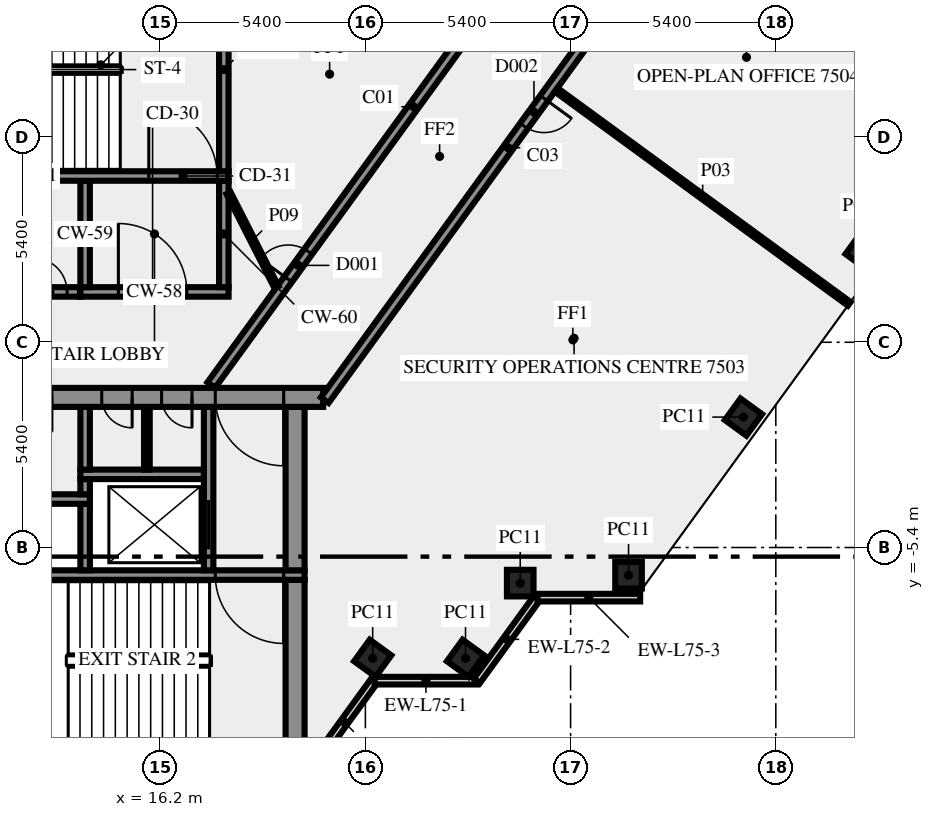
"""IFC4 building model, lengths in metres.
Left out: names, types, materials, properties, quantities, classifications, styles, units other than length and angle.
Written with IfcOpenShell. Run it as: python <this file> out.ifc"""

import sys

from ifc_helpers import new_model, si_unit, direction, frame, frame_2d, origin, origin_2d, place, context, subcontext, project, spatial, rectangle, extrude, element, fill, save


model = new_model("IFC4")
c1 = context("Model", 3, precision=1e-05, world=origin(), true_north=direction((0.0, 1.0)))
c2 = subcontext(c1, "Body", "Model", "MODEL_VIEW")
j1 = project(units=[si_unit("LENGTHUNIT", "METRE"), si_unit("PLANEANGLEUNIT", "RADIAN")], contexts=[c1])
p1 = place(None, origin())
s1 = spatial("IfcSite", under=j1, at=p1, CompositionType="ELEMENT")
p2 = place(p1, origin())
s2 = spatial("IfcBuilding", under=s1, at=p2, CompositionType="ELEMENT")
p3 = place(p2, frame((0.0, 0.0, 323.0)))
s3 = spatial("IfcBuildingStorey", under=s2, at=p3, CompositionType="ELEMENT", Elevation=323.0)
for number, where, z_axis, x_axis in (
    (1, (21.792, -8.315, 0.0), (0.0, 0.0, 1.0), (0.588, 0.809, 0.0)),
    (2, (24.235, -8.315, 0.0), (0.0, 0.0, 1.0), (0.588, 0.809, 0.0)),
    (3, (25.674, -6.337, 0.0), (0.0, 0.0, 1.0), (1.0, 0.0, 0.0)),
    (4, (28.525, -6.13, 0.0), (0.0, 0.0, 1.0), (1.0, 0.0, 0.0)),
    (5, (31.548, -1.969, 0.0), (0.0, 0.0, 1.0), (0.588, 0.809, 0.0)),
    (6, (34.722, 2.4, 0.0), (0.0, 0.0, 1.0), (0.588, 0.809, 0.0)),
):
    element("IfcColumn", number, at=place(p3, frame(where, z_axis=z_axis, x_axis=x_axis)), inside=s3, PredefinedType="COLUMN", context=c2, shape_type="SweptSolid", body=[
        extrude(rectangle(XDim=0.7, YDim=0.7, at=origin_2d()), origin(), (0.0, 0.0, 1.0), 3.65),
    ])
p4 = place(p3, frame((20.253, -11.083, 0.0), z_axis=(0.0, 0.0, 1.0), x_axis=(0.587766567315, 0.809030569476, 0.0)))
e7 = element("IfcWall", 7, at=p4, inside=s3, PredefinedType="SOLIDWALL", context=c2, shape_type="SweptSolid", body=[
    extrude(rectangle(XDim=2.688, YDim=0.2, at=frame_2d((1.344, 0.0))), origin(), (0.0, 0.0, 1.0), 3.65),
])
p5 = place(p3, frame((21.843, -8.904, 0.0), z_axis=(0.0, 0.0, 1.0), x_axis=(1.0, 0.0, 0.0)))
e8 = element("IfcWall", 8, at=p5, inside=s3, PredefinedType="SOLIDWALL", context=c2, shape_type="SweptSolid", body=[
    extrude(rectangle(XDim=2.7, YDim=0.2, at=frame_2d((1.35, 0.0))), origin(), (0.0, 0.0, 1.0), 3.65),
])
p6 = place(p3, frame((24.533, -8.909, 0.0), z_axis=(0.0, 0.0, 1.0), x_axis=(0.587720002413, 0.809064397168, 0.0)))
e9 = element("IfcWall", 9, at=p6, inside=s3, PredefinedType="SOLIDWALL", context=c2, shape_type="SweptSolid", body=[
    extrude(rectangle(XDim=2.7, YDim=0.2, at=frame_2d((1.35, 0.0))), origin(), (0.0, 0.0, 1.0), 3.65),
])
p7 = place(p3, frame((26.13, -6.719, 0.0), z_axis=(0.0, 0.0, 1.0), x_axis=(1.0, 0.0, 0.0)))
e10 = element("IfcWall", 10, at=p7, inside=s3, PredefinedType="SOLIDWALL", context=c2, shape_type="SweptSolid", body=[
    extrude(rectangle(XDim=2.7, YDim=0.2, at=frame_2d((1.35, 0.0))), origin(), (0.0, 0.0, 1.0), 3.65),
])
p8 = place(p3, frame((19.75, -10.5, 0.0), z_axis=(0.0, 0.0, 1.0), x_axis=(0.0, 1.0, 0.0)))
e11 = element("IfcWall", 11, at=p8, inside=s3, PredefinedType="SHEAR", context=c2, shape_type="SweptSolid", body=[
    extrude(rectangle(XDim=4.25, YDim=0.5, at=frame_2d((2.125, 0.0))), origin(), (0.0, 0.0, 1.0), 3.65),
])
p9 = place(p3, frame((20.0, -6.125, 0.0), z_axis=(0.0, 0.0, 1.0), x_axis=(-1.0, 0.0, 0.0)))
e12 = element("IfcWall", 12, at=p9, inside=s3, PredefinedType="SHEAR", context=c2, shape_type="SweptSolid", body=[
    extrude(rectangle(XDim=10.8, YDim=0.25, at=frame_2d((5.4, 0.0))), origin(), (0.0, 0.0, 1.0), 3.65),
])
p10 = place(p9, frame((0.55, 0.0, 0.0)))
e13 = element("IfcOpeningElement", 13, at=p10, cuts=e12, PredefinedType="OPENING", context=c2, shape_type="SweptSolid", body=[
    extrude(rectangle(XDim=1.8, YDim=2.1, at=frame_2d((0.9, 1.05))), frame((0.0, 0.135, 0.0), z_axis=(0.0, -1.0, 0.0), x_axis=(1.0, 0.0, 0.0)), (0.0, 0.0, 1.0), 0.27),
])
p11 = place(p3, frame((14.225, -6.0, 0.0), z_axis=(0.0, 0.0, 1.0), x_axis=(0.0, 1.0, 0.0)))
e14 = element("IfcWall", 14, at=p11, inside=s3, PredefinedType="SHEAR", context=c2, shape_type="SweptSolid", body=[
    extrude(rectangle(XDim=1.75, YDim=0.25, at=frame_2d((0.875, 0.0))), origin(), (0.0, 0.0, 1.0), 3.65),
])
p12 = place(p3, frame((17.475, -6.0, 0.0), z_axis=(0.0, 0.0, 1.0), x_axis=(0.0, 1.0, 0.0)))
e15 = element("IfcWall", 15, at=p12, inside=s3, PredefinedType="SHEAR", context=c2, shape_type="SweptSolid", body=[
    extrude(rectangle(XDim=4.3, YDim=0.25, at=frame_2d((2.15, 0.0))), origin(), (0.0, 0.0, 1.0), 3.65),
])
p13 = place(p12, frame((0.55, 0.0, 0.0)))
e16 = element("IfcOpeningElement", 16, at=p13, cuts=e15, PredefinedType="OPENING", context=c2, shape_type="SweptSolid", body=[
    extrude(rectangle(XDim=1.3, YDim=2.1, at=frame_2d((0.65, 1.05))), frame((0.0, 0.135, 0.0), z_axis=(0.0, -1.0, 0.0), x_axis=(1.0, 0.0, 0.0)), (0.0, 0.0, 1.0), 0.27),
])
p14 = place(p3, frame((19.75, -6.0, 0.0), z_axis=(0.0, 0.0, 1.0), x_axis=(0.0, 1.0, 0.0)))
e17 = element("IfcWall", 17, at=p14, inside=s3, PredefinedType="SHEAR", context=c2, shape_type="SweptSolid", body=[
    extrude(rectangle(XDim=4.3, YDim=0.5, at=frame_2d((2.15, 0.0))), origin(), (0.0, 0.0, 1.0), 3.65),
])
p15 = place(p3, frame((-0.6, -4.125, 0.0), z_axis=(0.0, 0.0, 1.0), x_axis=(1.0, 0.0, 0.0)))
e18 = element("IfcWall", 18, at=p15, inside=s3, PredefinedType="SHEAR", context=c2, shape_type="SweptSolid", body=[
    extrude(rectangle(XDim=14.95, YDim=0.25, at=frame_2d((7.475, 0.0))), origin(), (0.0, 0.0, 1.0), 3.65),
])
p16 = place(p15, frame((2.75, 0.0, 0.0)))
e19 = element("IfcOpeningElement", 19, at=p16, cuts=e18, PredefinedType="OPENING", context=c2, shape_type="SweptSolid", body=[
    extrude(rectangle(XDim=1.3, YDim=2.1, at=frame_2d((0.65, 1.05))), frame((0.0, 0.135, 0.0), z_axis=(0.0, -1.0, 0.0), x_axis=(1.0, 0.0, 0.0)), (0.0, 0.0, 1.0), 0.27),
])
p17 = place(p3, frame((14.225, -4.0, 0.0), z_axis=(0.0, 0.0, 1.0), x_axis=(0.0, 1.0, 0.0)))
e20 = element("IfcWall", 20, at=p17, inside=s3, PredefinedType="SHEAR", context=c2, shape_type="SweptSolid", body=[
    extrude(rectangle(XDim=0.4, YDim=0.25, at=frame_2d((0.2, 0.0))), origin(), (0.0, 0.0, 1.0), 3.65),
])
p18 = place(p3, frame((14.1, -3.475, 0.0), z_axis=(0.0, 0.0, 1.0), x_axis=(1.0, 0.0, 0.0)))
e21 = element("IfcWall", 21, at=p18, inside=s3, PredefinedType="SHEAR", context=c2, shape_type="SweptSolid", body=[
    extrude(rectangle(XDim=3.25, YDim=0.25, at=frame_2d((1.625, 0.0))), origin(), (0.0, 0.0, 1.0), 3.65),
])
p19 = place(p3, frame((14.225, -3.35, 0.0), z_axis=(0.0, 0.0, 1.0), x_axis=(0.0, 1.0, 0.0)))
e22 = element("IfcWall", 22, at=p19, inside=s3, PredefinedType="SHEAR", context=c2, shape_type="SweptSolid", body=[
    extrude(rectangle(XDim=1.65, YDim=0.25, at=frame_2d((0.825, 0.0))), origin(), (0.0, 0.0, 1.0), 3.65),
])
p20 = place(p3, frame((15.85, -3.35, 0.0), z_axis=(0.0, 0.0, 1.0), x_axis=(0.0, 1.0, 0.0)))
e23 = element("IfcWall", 23, at=p20, inside=s3, PredefinedType="PARTITIONING", context=c2, shape_type="SweptSolid", body=[
    extrude(rectangle(XDim=1.65, YDim=0.15, at=frame_2d((0.825, 0.0))), origin(), (0.0, 0.0, 1.0), 3.65),
])
p21 = place(p3, frame((20.49, -1.45, 0.0), z_axis=(0.0, 0.0, 1.0), x_axis=(-1.0, 0.0, 0.0)))
e24 = element("IfcWall", 24, at=p21, inside=s3, PredefinedType="SHEAR", context=c2, shape_type="SweptSolid", body=[
    extrude(rectangle(XDim=40.98, YDim=0.5, at=frame_2d((20.49, 0.0))), origin(), (0.0, 0.0, 1.0), 3.65),
])
p22 = place(p21, frame((38.14, 0.0, 0.0)))
e25 = element("IfcOpeningElement", 25, at=p22, cuts=e24, PredefinedType="OPENING", context=c2, shape_type="SweptSolid", body=[
    extrude(rectangle(XDim=1.8, YDim=2.1, at=frame_2d((0.9, 1.05))), frame((0.0, 0.26, 0.0), z_axis=(0.0, -1.0, 0.0), x_axis=(1.0, 0.0, 0.0)), (0.0, 0.0, 1.0), 0.52),
])
p23 = place(p21, frame((35.89, 0.0, 0.0)))
e26 = element("IfcOpeningElement", 26, at=p23, cuts=e24, PredefinedType="OPENING", context=c2, shape_type="SweptSolid", body=[
    extrude(rectangle(XDim=0.9, YDim=2.1, at=frame_2d((0.45, 1.05))), frame((0.0, 0.26, 0.0), z_axis=(0.0, -1.0, 0.0), x_axis=(1.0, 0.0, 0.0)), (0.0, 0.0, 1.0), 0.52),
])
p24 = place(p21, frame((32.94, 0.0, 0.0)))
e27 = element("IfcOpeningElement", 27, at=p24, cuts=e24, PredefinedType="OPENING", context=c2, shape_type="SweptSolid", body=[
    extrude(rectangle(XDim=0.9, YDim=2.1, at=frame_2d((0.45, 1.05))), frame((0.0, 0.26, 0.0), z_axis=(0.0, -1.0, 0.0), x_axis=(1.0, 0.0, 0.0)), (0.0, 0.0, 1.0), 0.52),
])
p25 = place(p21, frame((31.015, 0.0, 0.0)))
e28 = element("IfcOpeningElement", 28, at=p25, cuts=e24, PredefinedType="OPENING", context=c2, shape_type="SweptSolid", body=[
    extrude(rectangle(XDim=0.8, YDim=2.1, at=frame_2d((0.4, 1.05))), frame((0.0, 0.26, 0.0), z_axis=(0.0, -1.0, 0.0), x_axis=(1.0, 0.0, 0.0)), (0.0, 0.0, 1.0), 0.52),
])
p26 = place(p21, frame((24.765, 0.0, 0.0)))
e29 = element("IfcOpeningElement", 29, at=p26, cuts=e24, PredefinedType="OPENING", context=c2, shape_type="SweptSolid", body=[
    extrude(rectangle(XDim=0.8, YDim=2.1, at=frame_2d((0.4, 1.05))), frame((0.0, 0.26, 0.0), z_axis=(0.0, -1.0, 0.0), x_axis=(1.0, 0.0, 0.0)), (0.0, 0.0, 1.0), 0.52),
])
p27 = place(p21, frame((21.765, 0.0, 0.0)))
e30 = element("IfcOpeningElement", 30, at=p27, cuts=e24, PredefinedType="OPENING", context=c2, shape_type="SweptSolid", body=[
    extrude(rectangle(XDim=2.0, YDim=2.1, at=frame_2d((1.0, 1.05))), frame((0.0, 0.26, 0.0), z_axis=(0.0, -1.0, 0.0), x_axis=(1.0, 0.0, 0.0)), (0.0, 0.0, 1.0), 0.52),
])
p28 = place(p21, frame((15.103, 0.0, 0.0)))
e31 = element("IfcOpeningElement", 31, at=p28, cuts=e24, PredefinedType="OPENING", context=c2, shape_type="SweptSolid", body=[
    extrude(rectangle(XDim=0.9, YDim=2.1, at=frame_2d((0.45, 1.05))), frame((0.0, 0.26, 0.0), z_axis=(0.0, -1.0, 0.0), x_axis=(1.0, 0.0, 0.0)), (0.0, 0.0, 1.0), 0.52),
])
p29 = place(p21, frame((13.04, 0.0, 0.0)))
e32 = element("IfcOpeningElement", 32, at=p29, cuts=e24, PredefinedType="OPENING", context=c2, shape_type="SweptSolid", body=[
    extrude(rectangle(XDim=0.9, YDim=2.1, at=frame_2d((0.45, 1.05))), frame((0.0, 0.26, 0.0), z_axis=(0.0, -1.0, 0.0), x_axis=(1.0, 0.0, 0.0)), (0.0, 0.0, 1.0), 0.52),
])
p30 = place(p21, frame((10.177, 0.0, 0.0)))
e33 = element("IfcOpeningElement", 33, at=p30, cuts=e24, PredefinedType="OPENING", context=c2, shape_type="SweptSolid", body=[
    extrude(rectangle(XDim=0.9, YDim=2.1, at=frame_2d((0.45, 1.05))), frame((0.0, 0.26, 0.0), z_axis=(0.0, -1.0, 0.0), x_axis=(1.0, 0.0, 0.0)), (0.0, 0.0, 1.0), 0.52),
])
p31 = place(p21, frame((7.14, 0.0, 0.0)))
e34 = element("IfcOpeningElement", 34, at=p31, cuts=e24, PredefinedType="OPENING", context=c2, shape_type="SweptSolid", body=[
    extrude(rectangle(XDim=0.9, YDim=2.1, at=frame_2d((0.45, 1.05))), frame((0.0, 0.26, 0.0), z_axis=(0.0, -1.0, 0.0), x_axis=(1.0, 0.0, 0.0)), (0.0, 0.0, 1.0), 0.52),
])
p32 = place(p21, frame((5.028, 0.0, 0.0)))
e35 = element("IfcOpeningElement", 35, at=p32, cuts=e24, PredefinedType="OPENING", context=c2, shape_type="SweptSolid", body=[
    extrude(rectangle(XDim=0.8, YDim=2.1, at=frame_2d((0.4, 1.05))), frame((0.0, 0.26, 0.0), z_axis=(0.0, -1.0, 0.0), x_axis=(1.0, 0.0, 0.0)), (0.0, 0.0, 1.0), 0.52),
])
p33 = place(p21, frame((3.452, 0.0, 0.0)))
e36 = element("IfcOpeningElement", 36, at=p33, cuts=e24, PredefinedType="OPENING", context=c2, shape_type="SweptSolid", body=[
    extrude(rectangle(XDim=0.8, YDim=2.1, at=frame_2d((0.4, 1.05))), frame((0.0, 0.26, 0.0), z_axis=(0.0, -1.0, 0.0), x_axis=(1.0, 0.0, 0.0)), (0.0, 0.0, 1.0), 0.52),
])
p34 = place(p21, frame((1.04, 0.0, 0.0)))
e37 = element("IfcOpeningElement", 37, at=p34, cuts=e24, PredefinedType="OPENING", context=c2, shape_type="SweptSolid", body=[
    extrude(rectangle(XDim=1.8, YDim=2.1, at=frame_2d((0.9, 1.05))), frame((0.0, 0.26, 0.0), z_axis=(0.0, -1.0, 0.0), x_axis=(1.0, 0.0, 0.0)), (0.0, 0.0, 1.0), 0.52),
])
p35 = place(p3, frame((14.1, 1.325, 0.0), z_axis=(0.0, 0.0, 1.0), x_axis=(1.0, 0.0, 0.0)))
e38 = element("IfcWall", 38, at=p35, inside=s3, PredefinedType="SHEAR", context=c2, shape_type="SweptSolid", body=[
    extrude(rectangle(XDim=3.9, YDim=0.25, at=frame_2d((1.95, 0.0))), origin(), (0.0, 0.0, 1.0), 3.65),
])
p36 = place(p35, frame((1.0, 0.0, 0.0)))
e39 = element("IfcOpeningElement", 39, at=p36, cuts=e38, PredefinedType="OPENING", context=c2, shape_type="SweptSolid", body=[
    extrude(rectangle(XDim=1.8, YDim=2.1, at=frame_2d((0.9, 1.05))), frame((0.0, 0.135, 0.0), z_axis=(0.0, -1.0, 0.0), x_axis=(1.0, 0.0, 0.0)), (0.0, 0.0, 1.0), 0.27),
])
for number, where, z_axis, x_axis in (
    (40, (14.225, 1.45, 0.0), (0.0, 0.0, 1.0), (0.0, 1.0, 0.0)),
    (41, (17.875, 1.45, 0.0), (0.0, 0.0, 1.0), (0.0, 1.0, 0.0)),
):
    element("IfcWall", number, at=place(p3, frame(where, z_axis=z_axis, x_axis=x_axis)), inside=s3, PredefinedType="SHEAR", context=c2, shape_type="SweptSolid", body=[
        extrude(rectangle(XDim=2.8, YDim=0.25, at=frame_2d((1.4, 0.0))), origin(), (0.0, 0.0, 1.0), 3.65),
    ])
p37 = place(p3, frame((7.5, 4.375, 0.0), z_axis=(0.0, 0.0, 1.0), x_axis=(1.0, 0.0, 0.0)))
e42 = element("IfcWall", 42, at=p37, inside=s3, PredefinedType="SHEAR", context=c2, shape_type="SweptSolid", body=[
    extrude(rectangle(XDim=10.5, YDim=0.25, at=frame_2d((5.25, 0.0))), origin(), (0.0, 0.0, 1.0), 3.65),
])
p38 = place(p37, frame((8.4, 0.0, 0.0)))
e43 = element("IfcOpeningElement", 43, at=p38, cuts=e42, PredefinedType="OPENING", context=c2, shape_type="SweptSolid", body=[
    extrude(rectangle(XDim=1.8, YDim=2.1, at=frame_2d((0.9, 1.05))), frame((0.0, 0.135, 0.0), z_axis=(0.0, -1.0, 0.0), x_axis=(1.0, 0.0, 0.0)), (0.0, 0.0, 1.0), 0.27),
])
p39 = place(p3, frame((17.875, 4.5, 0.0), z_axis=(0.0, 0.0, 1.0), x_axis=(0.0, 1.0, 0.0)))
e44 = element("IfcWall", 44, at=p39, inside=s3, PredefinedType="SHEAR", context=c2, shape_type="SweptSolid", body=[
    extrude(rectangle(XDim=5.35, YDim=0.25, at=frame_2d((2.675, 0.0))), origin(), (0.0, 0.0, 1.0), 3.65),
])
p40 = place(p3, frame((17.545, -1.125, 0.0), z_axis=(0.0, 0.0, 1.0), x_axis=(0.58779555165, 0.809009511354, 0.0)))
e45 = element("IfcWall", 45, at=p40, inside=s3, PredefinedType="SOLIDWALL", context=c2, shape_type="SweptSolid", body=[
    extrude(rectangle(XDim=18.103, YDim=0.25, at=frame_2d((9.052, 0.0))), origin(), (0.0, 0.0, 1.0), 3.65),
])
p41 = place(p40, frame((3.441, 0.0, 0.0)))
e46 = element("IfcOpeningElement", 46, at=p41, cuts=e45, PredefinedType="OPENING", context=c2, shape_type="SweptSolid", body=[
    extrude(rectangle(XDim=0.9, YDim=2.1, at=frame_2d((0.45, 1.05))), frame((0.0, 0.135, 0.0), z_axis=(0.0, -1.0, 0.0), x_axis=(1.0, 0.0, 0.0)), (0.0, 0.0, 1.0), 0.27),
])
p42 = place(p3, frame((30.183, 11.761, 0.0), z_axis=(0.0, 0.0, 1.0), x_axis=(-0.587781762867, -0.80901952958, 0.0)))
e47 = element("IfcWall", 47, at=p42, inside=s3, PredefinedType="SOLIDWALL", context=c2, shape_type="SweptSolid", body=[
    extrude(rectangle(XDim=16.42, YDim=0.25, at=frame_2d((8.21, 0.0))), origin(), (0.0, 0.0, 1.0), 3.65),
])
p43 = place(p42, frame((0.225, 0.0, 0.0)))
e48 = element("IfcOpeningElement", 48, at=p43, cuts=e47, PredefinedType="OPENING", context=c2, shape_type="SweptSolid", body=[
    extrude(rectangle(XDim=0.9, YDim=2.1, at=frame_2d((0.45, 1.05))), frame((0.0, 0.135, 0.0), z_axis=(0.0, -1.0, 0.0), x_axis=(1.0, 0.0, 0.0)), (0.0, 0.0, 1.0), 0.27),
])
p44 = place(p42, frame((6.605, 0.0, 0.0)))
e49 = element("IfcOpeningElement", 49, at=p44, cuts=e47, PredefinedType="OPENING", context=c2, shape_type="SweptSolid", body=[
    extrude(rectangle(XDim=0.9, YDim=2.1, at=frame_2d((0.45, 1.05))), frame((0.0, 0.135, 0.0), z_axis=(0.0, -1.0, 0.0), x_axis=(1.0, 0.0, 0.0)), (0.0, 0.0, 1.0), 0.27),
])
p45 = place(p3, frame((-5.246, 1.325, 0.0), z_axis=(0.0, 0.0, 1.0), x_axis=(1.0, 0.0, 0.0)))
e50 = element("IfcWall", 50, at=p45, inside=s3, PredefinedType="SOLIDWALL", context=c2, shape_type="SweptSolid", body=[
    extrude(rectangle(XDim=19.336, YDim=0.25, at=frame_2d((9.668, 0.0))), origin(), (0.0, 0.0, 1.0), 3.65),
])
p46 = place(p45, frame((10.894, 0.0, 0.0)))
e51 = element("IfcOpeningElement", 51, at=p46, cuts=e50, PredefinedType="OPENING", context=c2, shape_type="SweptSolid", body=[
    extrude(rectangle(XDim=1.2, YDim=2.1, at=frame_2d((0.6, 1.05))), frame((0.0, 0.135, 0.0), z_axis=(0.0, -1.0, 0.0), x_axis=(1.0, 0.0, 0.0)), (0.0, 0.0, 1.0), 0.27),
])
p47 = place(p45, frame((18.096, 0.0, 0.0)))
e52 = element("IfcOpeningElement", 52, at=p47, cuts=e50, PredefinedType="OPENING", context=c2, shape_type="SweptSolid", body=[
    extrude(rectangle(XDim=0.9, YDim=2.1, at=frame_2d((0.45, 1.05))), frame((0.0, 0.135, 0.0), z_axis=(0.0, -1.0, 0.0), x_axis=(1.0, 0.0, 0.0)), (0.0, 0.0, 1.0), 0.27),
])
p48 = place(p3, frame((37.458, 6.76, 0.0), z_axis=(0.0, 0.0, 1.0), x_axis=(-0.809016295501, 0.587786214209, 0.0)))
e53 = element("IfcWall", 53, at=p48, inside=s3, PredefinedType="PARTITIONING", context=c2, shape_type="SweptSolid", body=[
    extrude(rectangle(XDim=8.7, YDim=0.12, at=frame_2d((4.35, 0.0))), origin(), (0.0, 0.0, 1.0), 3.65),
])
p49 = place(p3, frame((26.619, 6.643, 0.0), z_axis=(0.0, 0.0, 1.0), x_axis=(0.807594822539, -0.589737740532, 0.0)))
e54 = element("IfcWall", 54, at=p49, inside=s3, PredefinedType="PARTITIONING", context=c2, shape_type="SweptSolid", body=[
    extrude(rectangle(XDim=9.55, YDim=0.12, at=frame_2d((4.775, 0.0))), origin(), (0.0, 0.0, 1.0), 2.95),
])
p50 = place(p3, frame((18.0, 3.925, 0.0), z_axis=(0.0, 0.0, 1.0), x_axis=(0.453950796792, -0.891026752736, 0.0)))
e55 = element("IfcWall", 55, at=p50, inside=s3, PredefinedType="PARTITIONING", context=c2, shape_type="SweptSolid", body=[
    extrude(rectangle(XDim=2.778, YDim=0.12, at=frame_2d((1.389, 0.0))), origin(), (0.0, 0.0, 1.0), 3.65),
])
p51 = place(p10, origin())
e56 = element("IfcDoor", 56, at=p51, inside=s3, OperationType="DOUBLE_DOOR_SINGLE_SWING", PredefinedType="DOOR", context=c2, shape_type="SweptSolid", body=[
    extrude(rectangle(XDim=1.8, YDim=2.1, at=frame_2d((0.9, 1.05))), frame((0.0, 0.025, 0.0), z_axis=(0.0, -1.0, 0.0), x_axis=(1.0, 0.0, 0.0)), (0.0, 0.0, 1.0), 0.05),
])
fill(e13, e56)
p52 = place(p13, origin())
e57 = element("IfcDoor", 57, at=p52, inside=s3, OperationType="DOUBLE_DOOR_SLIDING", PredefinedType="DOOR", context=c2, shape_type="SweptSolid", body=[
    extrude(rectangle(XDim=1.3, YDim=2.1, at=frame_2d((0.65, 1.05))), frame((0.0, 0.025, 0.0), z_axis=(0.0, -1.0, 0.0), x_axis=(1.0, 0.0, 0.0)), (0.0, 0.0, 1.0), 0.05),
])
fill(e16, e57)
p53 = place(p32, origin())
e58 = element("IfcDoor", 58, at=p53, inside=s3, OperationType="SINGLE_SWING_LEFT", PredefinedType="DOOR", context=c2, shape_type="SweptSolid", body=[
    extrude(rectangle(XDim=0.8, YDim=2.1, at=frame_2d((0.4, 1.05))), frame((0.0, 0.025, 0.0), z_axis=(0.0, -1.0, 0.0), x_axis=(1.0, 0.0, 0.0)), (0.0, 0.0, 1.0), 0.05),
])
fill(e35, e58)
p54 = place(p33, origin())
e59 = element("IfcDoor", 59, at=p54, inside=s3, OperationType="SINGLE_SWING_LEFT", PredefinedType="DOOR", context=c2, shape_type="SweptSolid", body=[
    extrude(rectangle(XDim=0.8, YDim=2.1, at=frame_2d((0.4, 1.05))), frame((0.0, 0.025, 0.0), z_axis=(0.0, -1.0, 0.0), x_axis=(1.0, 0.0, 0.0)), (0.0, 0.0, 1.0), 0.05),
])
fill(e36, e59)
p55 = place(p34, origin())
e60 = element("IfcDoor", 60, at=p55, inside=s3, OperationType="DOUBLE_DOOR_SINGLE_SWING", PredefinedType="DOOR", context=c2, shape_type="SweptSolid", body=[
    extrude(rectangle(XDim=1.8, YDim=2.1, at=frame_2d((0.9, 1.05))), frame((0.0, 0.025, 0.0), z_axis=(0.0, -1.0, 0.0), x_axis=(1.0, 0.0, 0.0)), (0.0, 0.0, 1.0), 0.05),
])
fill(e37, e60)
p56 = place(p36, origin())
e61 = element("IfcDoor", 61, at=p56, inside=s3, OperationType="DOUBLE_DOOR_SINGLE_SWING", PredefinedType="DOOR", context=c2, shape_type="SweptSolid", body=[
    extrude(rectangle(XDim=1.8, YDim=2.1, at=frame_2d((0.9, 1.05))), frame((0.0, 0.025, 0.0), z_axis=(0.0, -1.0, 0.0), x_axis=(1.0, 0.0, 0.0)), (0.0, 0.0, 1.0), 0.05),
])
fill(e39, e61)
p57 = place(p38, origin())
e62 = element("IfcDoor", 62, at=p57, inside=s3, OperationType="DOUBLE_DOOR_SINGLE_SWING", PredefinedType="DOOR", context=c2, shape_type="SweptSolid", body=[
    extrude(rectangle(XDim=1.8, YDim=2.1, at=frame_2d((0.9, 1.05))), frame((0.0, 0.025, 0.0), z_axis=(0.0, -1.0, 0.0), x_axis=(1.0, 0.0, 0.0)), (0.0, 0.0, 1.0), 0.05),
])
fill(e43, e62)
p58 = place(p41, origin())
e63 = element("IfcDoor", 63, at=p58, inside=s3, OperationType="SINGLE_SWING_LEFT", PredefinedType="DOOR", context=c2, shape_type="SweptSolid", body=[
    extrude(rectangle(XDim=0.9, YDim=2.1, at=frame_2d((0.45, 1.05))), frame((0.0, 0.025, 0.0), z_axis=(0.0, -1.0, 0.0), x_axis=(1.0, 0.0, 0.0)), (0.0, 0.0, 1.0), 0.05),
])
fill(e46, e63)
p59 = place(p44, origin())
e64 = element("IfcDoor", 64, at=p59, inside=s3, OperationType="SINGLE_SWING_LEFT", PredefinedType="DOOR", context=c2, shape_type="SweptSolid", body=[
    extrude(rectangle(XDim=0.9, YDim=2.1, at=frame_2d((0.45, 1.05))), frame((0.0, 0.025, 0.0), z_axis=(0.0, -1.0, 0.0), x_axis=(1.0, 0.0, 0.0)), (0.0, 0.0, 1.0), 0.05),
])
fill(e49, e64)
p60 = place(p47, origin())
e65 = element("IfcDoor", 65, at=p60, inside=s3, OperationType="SINGLE_SWING_RIGHT", PredefinedType="DOOR", context=c2, shape_type="SweptSolid", body=[
    extrude(rectangle(XDim=0.9, YDim=2.1, at=frame_2d((0.45, 1.05))), frame((0.0, 0.025, 0.0), z_axis=(0.0, -1.0, 0.0), x_axis=(1.0, 0.0, 0.0)), (0.0, 0.0, 1.0), 0.05),
])
fill(e52, e65)
save(model, sys.argv[1])
